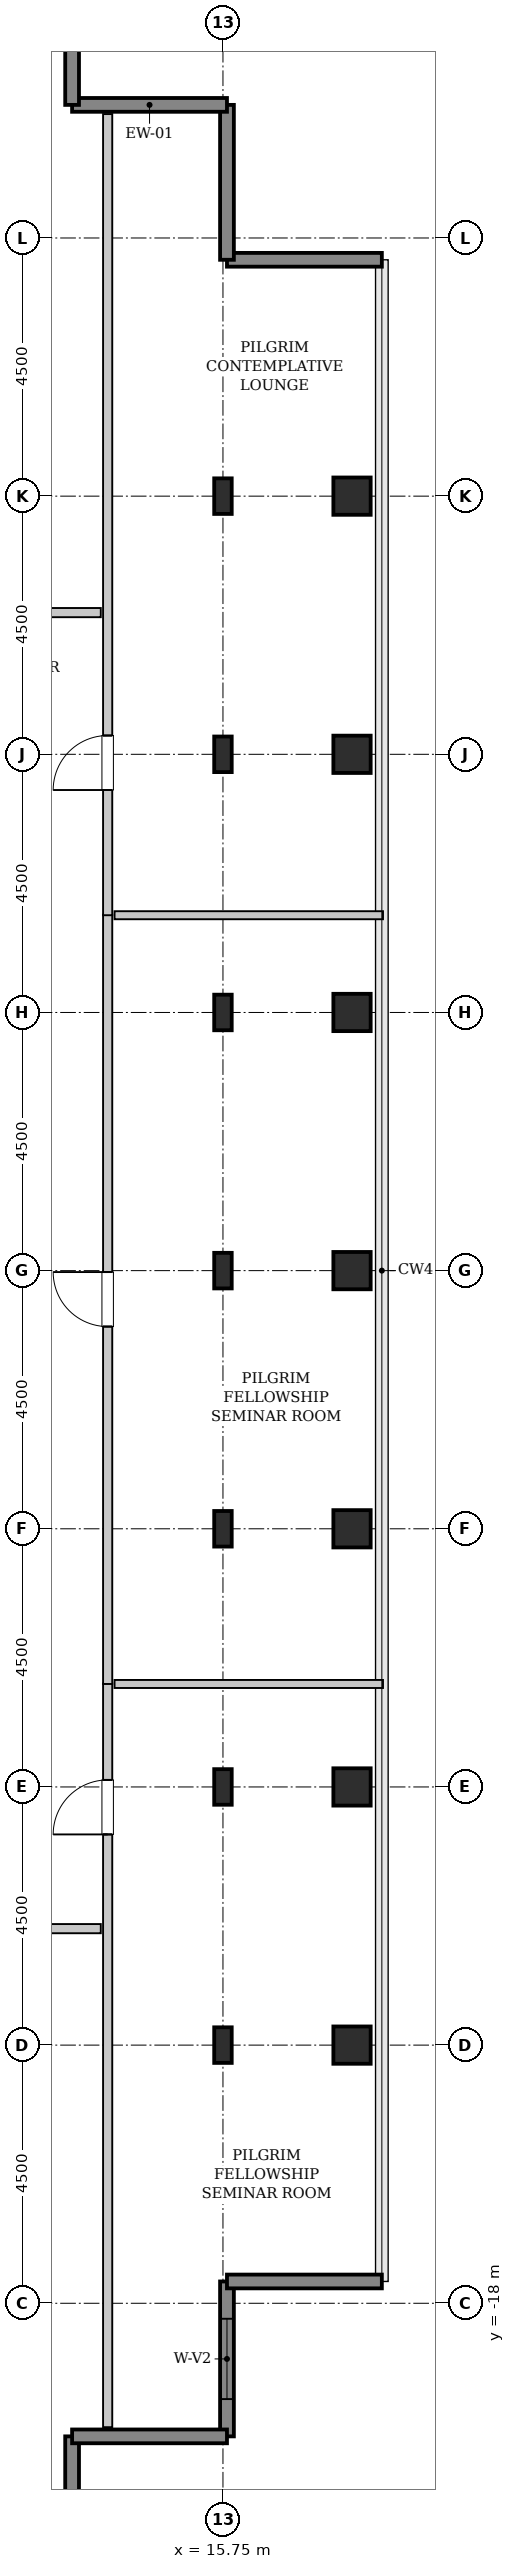
"""IFC4 building model, lengths in metres.
Left out: names, types, materials, properties, quantities, classifications, styles, units other than length and angle.
Written with IfcOpenShell. Run it as: python <this file> out.ifc"""

import sys

from ifc_helpers import new_model, si_unit, direction, frame, frame_2d, origin, origin_2d, place, context, subcontext, project, spatial, rectangle, hollow_rectangle, i_section, extrude, source, transform, mapped, element, fill, save


model = new_model("IFC4")
c1 = context("Model", 3, precision=1e-05, world=origin(), true_north=direction((0.0, 1.0)))
c2 = subcontext(c1, "Body", "Model", "MODEL_VIEW")
j1 = project(units=[si_unit("LENGTHUNIT", "METRE"), si_unit("PLANEANGLEUNIT", "RADIAN")], contexts=[c1])
p1 = place(None, origin())
s1 = spatial("IfcSite", under=j1, at=p1, CompositionType="ELEMENT")
p2 = place(p1, origin())
s2 = spatial("IfcBuilding", under=s1, at=p2, CompositionType="ELEMENT")
p3 = place(p2, frame((0.0, 0.0, 279.8)))
s3 = spatial("IfcBuildingStorey", under=s2, at=p3, CompositionType="ELEMENT", Elevation=279.8)
m1 = source(origin(), c2, "Body", "SweptSolid", [
    extrude(i_section(OverallWidth=0.305, OverallDepth=0.62, WebThickness=0.021, FlangeThickness=0.04, FilletRadius=0.027, at=origin_2d()), origin(), (0.0, 0.0, 1.0), 3.8),
])
for number, where, z_axis, x_axis in (
    (1, (15.75, -13.5, 0.0), (0.0, 0.0, 1.0), (1.0, 0.0, 0.0)),
    (2, (15.75, -9.0, 0.0), (0.0, 0.0, 1.0), (1.0, 0.0, 0.0)),
    (3, (15.75, -4.5, 0.0), (0.0, 0.0, 1.0), (1.0, 0.0, 0.0)),
    (4, (15.75, 0.0, 0.0), (0.0, 0.0, 1.0), (1.0, 0.0, 0.0)),
    (5, (15.75, 4.5, 0.0), (0.0, 0.0, 1.0), (1.0, 0.0, 0.0)),
    (6, (15.75, 9.0, 0.0), (0.0, 0.0, 1.0), (1.0, 0.0, 0.0)),
    (7, (15.75, 13.5, 0.0), (0.0, 0.0, 1.0), (1.0, 0.0, 0.0)),
):
    element("IfcColumn", number, at=place(p3, frame(where, z_axis=z_axis, x_axis=x_axis)), inside=s3, PredefinedType="COLUMN", context=c2, shape_type="MappedRepresentation", body=[
        mapped(m1, transform((0.0, 0.0, 0.0), x_axis=(1.0, 0.0, 0.0), y_axis=(0.0, 1.0, 0.0), z_axis=(0.0, 0.0, 1.0), scale=1.0)),
    ])
m2 = source(origin(), c2, "Body", "SweptSolid", [
    extrude(hollow_rectangle(XDim=0.65, YDim=0.65, WallThickness=0.032, InnerFilletRadius=0.032, OuterFilletRadius=0.064, at=origin_2d()), origin(), (0.0, 0.0, 1.0), 3.8),
])
for number, where, z_axis, x_axis in (
    (8, (18.0, -13.5, 0.0), (0.0, 0.0, 1.0), (1.0, 0.0, 0.0)),
    (9, (18.0, -9.0, 0.0), (0.0, 0.0, 1.0), (1.0, 0.0, 0.0)),
    (10, (18.0, -4.5, 0.0), (0.0, 0.0, 1.0), (1.0, 0.0, 0.0)),
    (11, (18.0, 0.0, 0.0), (0.0, 0.0, 1.0), (1.0, 0.0, 0.0)),
    (12, (18.0, 4.5, 0.0), (0.0, 0.0, 1.0), (1.0, 0.0, 0.0)),
    (13, (18.0, 9.0, 0.0), (0.0, 0.0, 1.0), (1.0, 0.0, 0.0)),
    (14, (18.0, 13.5, 0.0), (0.0, 0.0, 1.0), (1.0, 0.0, 0.0)),
):
    element("IfcColumn", number, at=place(p3, frame(where, z_axis=z_axis, x_axis=x_axis)), inside=s3, PredefinedType="COLUMN", context=c2, shape_type="MappedRepresentation", body=[
        mapped(m2, transform((0.0, 0.0, 0.0), x_axis=(1.0, 0.0, 0.0), y_axis=(0.0, 1.0, 0.0), z_axis=(0.0, 0.0, 1.0), scale=1.0)),
    ])
m3 = source(origin(), c2, "Body", "SweptSolid", [
    extrude(rectangle(XDim=2.7, YDim=0.24, at=frame_2d((1.35, 0.0))), origin(), (0.0, 0.0, 1.0), 3.55),
])
p4 = place(p3, frame((15.82, -20.32, 0.0), z_axis=(0.0, 0.0, 1.0), x_axis=(0.0, 1.0, 0.0)))
e15 = element("IfcWall", 15, at=p4, inside=s3, PredefinedType="SHEAR", context=c2, shape_type="MappedRepresentation", body=[
    mapped(m3, transform((0.0, 0.0, 0.0), x_axis=(1.0, 0.0, 0.0), y_axis=(0.0, 1.0, 0.0), z_axis=(0.0, 0.0, 1.0), scale=1.0)),
])
p5 = place(p4, frame((0.65, 0.0, 0.85)))
e16 = element("IfcOpeningElement", 16, at=p5, cuts=e15, PredefinedType="OPENING", context=c2, shape_type="SweptSolid", body=[
    extrude(rectangle(XDim=1.4, YDim=1.8, at=frame_2d((0.7, 0.9))), frame((0.0, 0.13, 0.0), z_axis=(0.0, -1.0, 0.0), x_axis=(1.0, 0.0, 0.0)), (0.0, 0.0, 1.0), 0.26),
])
for number, where, z_axis, x_axis in (
    (17, (15.82, -17.62, 0.0), (0.0, 0.0, 1.0), (1.0, 0.0, 0.0)),
    (18, (18.52, 17.62, 0.0), (0.0, 0.0, 1.0), (-1.0, 0.0, 0.0)),
    (19, (15.82, 17.62, 0.0), (0.0, 0.0, 1.0), (0.0, 1.0, 0.0)),
    (20, (15.82, 20.32, 0.0), (0.0, 0.0, 1.0), (-1.0, 0.0, 0.0)),
    (21, (13.12, 20.32, 0.0), (0.0, 0.0, 1.0), (0.0, 1.0, 0.0)),
    (22, (13.12, -23.02, 0.0), (0.0, 0.0, 1.0), (0.0, 1.0, 0.0)),
    (23, (13.12, -20.32, 0.0), (0.0, 0.0, 1.0), (1.0, 0.0, 0.0)),
):
    element("IfcWall", number, at=place(p3, frame(where, z_axis=z_axis, x_axis=x_axis)), inside=s3, PredefinedType="SHEAR", context=c2, shape_type="MappedRepresentation", body=[
        mapped(m3, transform((0.0, 0.0, 0.0), x_axis=(1.0, 0.0, 0.0), y_axis=(0.0, 1.0, 0.0), z_axis=(0.0, 0.0, 1.0), scale=1.0)),
    ])
m4 = source(origin(), c2, "Body", "SweptSolid", [
    extrude(rectangle(XDim=12.965, YDim=0.16, at=frame_2d((6.482, 0.0))), origin(), (0.0, 0.0, 1.0), 3.535),
])
p6 = place(p3, frame((13.74, -20.16, 0.0), z_axis=(0.0, 0.0, 1.0), x_axis=(0.0, 1.0, 0.0)))
e24 = element("IfcWall", 24, at=p6, inside=s3, PredefinedType="PARTITIONING", context=c2, shape_type="MappedRepresentation", body=[
    mapped(m4, transform((0.0, 0.0, 0.0), x_axis=(1.0, 0.0, 0.0), y_axis=(0.0, 1.0, 0.0), z_axis=(0.0, 0.0, 1.0), scale=1.0)),
])
p7 = place(p6, frame((10.333, 0.0, 0.0)))
e25 = element("IfcOpeningElement", 25, at=p7, cuts=e24, PredefinedType="OPENING", context=c2, shape_type="SweptSolid", body=[
    extrude(rectangle(XDim=0.95, YDim=2.1, at=frame_2d((0.475, 1.05))), frame((0.0, 0.09, 0.0), z_axis=(0.0, -1.0, 0.0), x_axis=(1.0, 0.0, 0.0)), (0.0, 0.0, 1.0), 0.18),
])
m5 = source(origin(), c2, "Body", "SweptSolid", [
    extrude(rectangle(XDim=4.68, YDim=0.14, at=frame_2d((2.34, 0.0))), origin(), (0.0, 0.0, 1.0), 3.535),
])
p8 = place(p3, frame((13.86, -7.205, 0.0), z_axis=(0.0, 0.0, 1.0), x_axis=(1.0, 0.0, 0.0)))
e26 = element("IfcWall", 26, at=p8, inside=s3, PredefinedType="PARTITIONING", context=c2, shape_type="MappedRepresentation", body=[
    mapped(m5, transform((0.0, 0.0, 0.0), x_axis=(1.0, 0.0, 0.0), y_axis=(0.0, 1.0, 0.0), z_axis=(0.0, 0.0, 1.0), scale=1.0)),
])
m6 = source(origin(), c2, "Body", "SweptSolid", [
    extrude(rectangle(XDim=13.41, YDim=0.16, at=frame_2d((6.705, 0.0))), origin(), (0.0, 0.0, 1.0), 3.535),
])
p9 = place(p3, frame((13.74, -7.205, 0.0), z_axis=(0.0, 0.0, 1.0), x_axis=(0.0, 1.0, 0.0)))
e27 = element("IfcWall", 27, at=p9, inside=s3, PredefinedType="PARTITIONING", context=c2, shape_type="MappedRepresentation", body=[
    mapped(m6, transform((0.0, 0.0, 0.0), x_axis=(1.0, 0.0, 0.0), y_axis=(0.0, 1.0, 0.0), z_axis=(0.0, 0.0, 1.0), scale=1.0)),
])
p10 = place(p9, frame((6.23, 0.0, 0.0)))
e28 = element("IfcOpeningElement", 28, at=p10, cuts=e27, PredefinedType="OPENING", context=c2, shape_type="SweptSolid", body=[
    extrude(rectangle(XDim=0.95, YDim=2.1, at=frame_2d((0.475, 1.05))), frame((0.0, 0.09, 0.0), z_axis=(0.0, -1.0, 0.0), x_axis=(1.0, 0.0, 0.0)), (0.0, 0.0, 1.0), 0.18),
])
p11 = place(p3, frame((13.86, 6.195, 0.0), z_axis=(0.0, 0.0, 1.0), x_axis=(1.0, 0.0, 0.0)))
e29 = element("IfcWall", 29, at=p11, inside=s3, PredefinedType="PARTITIONING", context=c2, shape_type="MappedRepresentation", body=[
    mapped(m5, transform((0.0, 0.0, 0.0), x_axis=(1.0, 0.0, 0.0), y_axis=(0.0, 1.0, 0.0), z_axis=(0.0, 0.0, 1.0), scale=1.0)),
])
m7 = source(origin(), c2, "Body", "SweptSolid", [
    extrude(rectangle(XDim=13.965, YDim=0.16, at=frame_2d((6.982, 0.0))), origin(), (0.0, 0.0, 1.0), 3.535),
])
p12 = place(p3, frame((13.74, 6.195, 0.0), z_axis=(0.0, 0.0, 1.0), x_axis=(0.0, 1.0, 0.0)))
e30 = element("IfcWall", 30, at=p12, inside=s3, PredefinedType="PARTITIONING", context=c2, shape_type="MappedRepresentation", body=[
    mapped(m7, transform((0.0, 0.0, 0.0), x_axis=(1.0, 0.0, 0.0), y_axis=(0.0, 1.0, 0.0), z_axis=(0.0, 0.0, 1.0), scale=1.0)),
])
p13 = place(p12, frame((2.183, 0.0, 0.0)))
e31 = element("IfcOpeningElement", 31, at=p13, cuts=e30, PredefinedType="OPENING", context=c2, shape_type="SweptSolid", body=[
    extrude(rectangle(XDim=0.95, YDim=2.1, at=frame_2d((0.475, 1.05))), frame((0.0, 0.09, 0.0), z_axis=(0.0, -1.0, 0.0), x_axis=(1.0, 0.0, 0.0)), (0.0, 0.0, 1.0), 0.18),
])
m8 = source(origin(), c2, "Body", "SweptSolid", [
    extrude(rectangle(XDim=6.825, YDim=0.16, at=frame_2d((3.413, 0.0))), origin(), (0.0, 0.0, 1.0), 3.535),
])
p14 = place(p3, frame((6.795, 11.47, 0.0), z_axis=(0.0, 0.0, 1.0), x_axis=(1.0, 0.0, 0.0)))
e32 = element("IfcWall", 32, at=p14, inside=s3, PredefinedType="PARTITIONING", context=c2, shape_type="MappedRepresentation", body=[
    mapped(m8, transform((0.0, 0.0, 0.0), x_axis=(1.0, 0.0, 0.0), y_axis=(0.0, 1.0, 0.0), z_axis=(0.0, 0.0, 1.0), scale=1.0)),
])
p15 = place(p14, frame((2.938, 0.0, 0.0)))
e33 = element("IfcOpeningElement", 33, at=p15, cuts=e32, PredefinedType="OPENING", context=c2, shape_type="SweptSolid", body=[
    extrude(rectangle(XDim=0.95, YDim=2.1, at=frame_2d((0.475, 1.05))), frame((0.0, 0.09, 0.0), z_axis=(0.0, -1.0, 0.0), x_axis=(1.0, 0.0, 0.0)), (0.0, 0.0, 1.0), 0.18),
])
m9 = source(origin(), c2, "Body", "SweptSolid", [
    extrude(rectangle(XDim=6.025, YDim=0.16, at=frame_2d((3.013, 0.0))), origin(), (0.0, 0.0, 1.0), 3.535),
])
p16 = place(p3, frame((7.595, -11.47, 0.0), z_axis=(0.0, 0.0, 1.0), x_axis=(1.0, 0.0, 0.0)))
e34 = element("IfcWall", 34, at=p16, inside=s3, PredefinedType="PARTITIONING", context=c2, shape_type="MappedRepresentation", body=[
    mapped(m9, transform((0.0, 0.0, 0.0), x_axis=(1.0, 0.0, 0.0), y_axis=(0.0, 1.0, 0.0), z_axis=(0.0, 0.0, 1.0), scale=1.0)),
])
p17 = place(p16, frame((2.538, 0.0, 0.0)))
e35 = element("IfcOpeningElement", 35, at=p17, cuts=e34, PredefinedType="OPENING", context=c2, shape_type="SweptSolid", body=[
    extrude(rectangle(XDim=0.95, YDim=2.1, at=frame_2d((0.475, 1.05))), frame((0.0, 0.09, 0.0), z_axis=(0.0, -1.0, 0.0), x_axis=(1.0, 0.0, 0.0)), (0.0, 0.0, 1.0), 0.18),
])
m10 = source(origin(), c2, "Body", "SweptSolid", [
    extrude(rectangle(XDim=1.4, YDim=1.8, at=frame_2d((0.7, 0.9))), frame((0.0, 0.03, 0.0), z_axis=(0.0, -1.0, 0.0), x_axis=(1.0, 0.0, 0.0)), (0.0, 0.0, 1.0), 0.06),
])
p18 = place(p5, origin())
e36 = element("IfcWindow", 36, at=p18, inside=s3, PartitioningType="SINGLE_PANEL", PredefinedType="WINDOW", context=c2, shape_type="MappedRepresentation", body=[
    mapped(m10, transform((0.0, 0.0, 0.0), x_axis=(1.0, 0.0, 0.0), y_axis=(0.0, 1.0, 0.0), z_axis=(0.0, 0.0, 1.0), scale=1.0)),
])
fill(e16, e36)
m11 = source(origin(), c2, "Body", "SweptSolid", [
    extrude(rectangle(XDim=0.95, YDim=2.1, at=frame_2d((0.475, 1.05))), frame((0.0, 0.025, 0.0), z_axis=(0.0, -1.0, 0.0), x_axis=(1.0, 0.0, 0.0)), (0.0, 0.0, 1.0), 0.05),
])
p19 = place(p7, origin())
e37 = element("IfcDoor", 37, at=p19, inside=s3, OperationType="SINGLE_SWING_LEFT", PredefinedType="DOOR", context=c2, shape_type="MappedRepresentation", body=[
    mapped(m11, transform((0.0, 0.0, 0.0), x_axis=(1.0, 0.0, 0.0), y_axis=(0.0, 1.0, 0.0), z_axis=(0.0, 0.0, 1.0), scale=1.0)),
])
fill(e25, e37)
p20 = place(p10, origin())
e38 = element("IfcDoor", 38, at=p20, inside=s3, OperationType="SINGLE_SWING_RIGHT", PredefinedType="DOOR", context=c2, shape_type="MappedRepresentation", body=[
    mapped(m11, transform((0.0, 0.0, 0.0), x_axis=(1.0, 0.0, 0.0), y_axis=(0.0, 1.0, 0.0), z_axis=(0.0, 0.0, 1.0), scale=1.0)),
])
fill(e28, e38)
p21 = place(p13, origin())
e39 = element("IfcDoor", 39, at=p21, inside=s3, OperationType="SINGLE_SWING_LEFT", PredefinedType="DOOR", context=c2, shape_type="MappedRepresentation", body=[
    mapped(m11, transform((0.0, 0.0, 0.0), x_axis=(1.0, 0.0, 0.0), y_axis=(0.0, 1.0, 0.0), z_axis=(0.0, 0.0, 1.0), scale=1.0)),
])
fill(e31, e39)
save(model, sys.argv[1])
